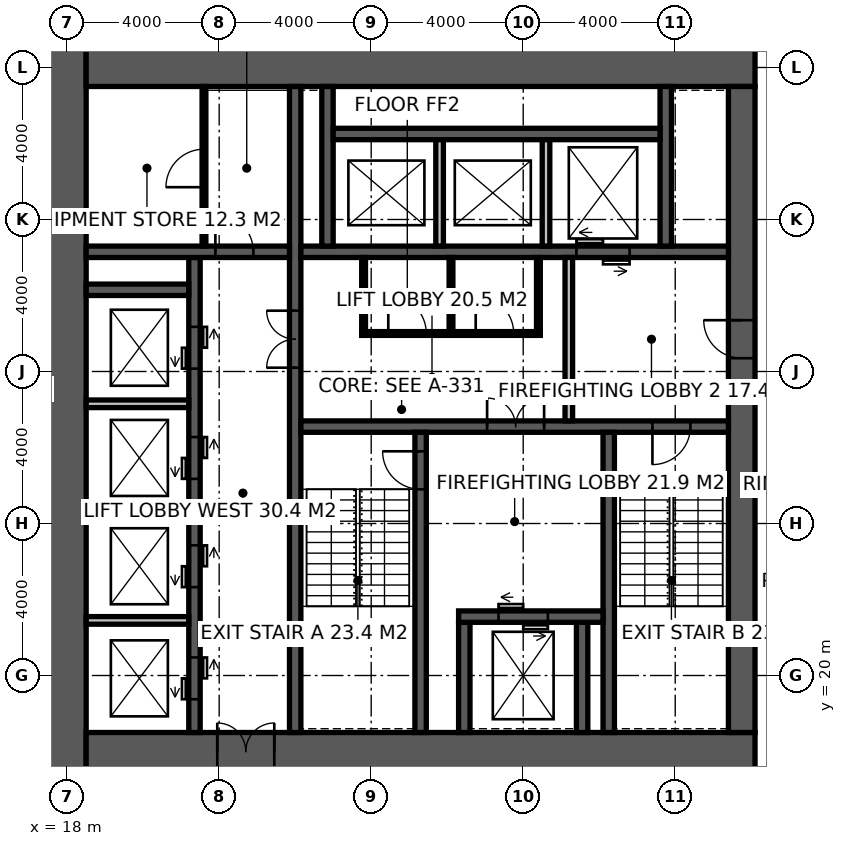
"""IFC4 building model, lengths in metres.
Left out: names, types, materials, properties, quantities, classifications, styles, units other than length and angle.
Written with IfcOpenShell. Run it as: python <this file> out.ifc"""

import sys

from ifc_helpers import new_model, si_unit, direction, frame, frame_2d, origin, place, context, subcontext, project, spatial, rectangle, extrude, element, fill, save


model = new_model("IFC4")
c1 = context("Model", 3, precision=1e-05, world=origin(), true_north=direction((0.0, 1.0)))
c2 = subcontext(c1, "Body", "Model", "MODEL_VIEW")
j1 = project(units=[si_unit("LENGTHUNIT", "METRE"), si_unit("PLANEANGLEUNIT", "RADIAN")], contexts=[c1])
p1 = place(None, origin())
s1 = spatial("IfcSite", under=j1, at=p1, CompositionType="ELEMENT")
p2 = place(p1, origin())
s2 = spatial("IfcBuilding", under=s1, at=p2, CompositionType="ELEMENT")
p3 = place(p2, frame((0.0, 0.0, 179.8)))
s3 = spatial("IfcBuildingStorey", under=s2, at=p3, CompositionType="ELEMENT", Elevation=179.8)
p4 = place(p3, frame((18.0, 17.5, -0.15), z_axis=(0.0, 0.0, 1.0), x_axis=(0.0, 1.0, 0.0)))
e1 = element("IfcWall", 1, at=p4, inside=s3, PredefinedType="SHEAR", context=c2, shape_type="SweptSolid", body=[
    extrude(rectangle(XDim=19.0, YDim=1.0, at=frame_2d((9.5, 0.0))), origin(), (0.0, 0.0, 1.0), 4.0),
])
p5 = place(p3, frame((18.5, 18.0, -0.15), z_axis=(0.0, 0.0, 1.0), x_axis=(1.0, 0.0, 0.0)))
e2 = element("IfcWall", 2, at=p5, inside=s3, PredefinedType="SHEAR", context=c2, shape_type="SweptSolid", body=[
    extrude(rectangle(XDim=17.6, YDim=1.0, at=frame_2d((8.8, 0.0))), origin(), (0.0, 0.0, 1.0), 4.0),
])
p6 = place(p5, frame((3.45, 0.0, 0.15)))
e3 = element("IfcOpeningElement", 3, at=p6, cuts=e2, PredefinedType="OPENING", context=c2, shape_type="SweptSolid", body=[
    extrude(rectangle(XDim=1.5, YDim=2.4, at=frame_2d((0.75, 1.2))), frame((0.0, 0.51, 0.0), z_axis=(0.0, -1.0, 0.0), x_axis=(1.0, 0.0, 0.0)), (0.0, 0.0, 1.0), 1.02),
])
p7 = place(p3, frame((18.5, 36.0, -0.15), z_axis=(0.0, 0.0, 1.0), x_axis=(1.0, 0.0, 0.0)))
e4 = element("IfcWall", 4, at=p7, inside=s3, PredefinedType="SHEAR", context=c2, shape_type="SweptSolid", body=[
    extrude(rectangle(XDim=17.6, YDim=1.0, at=frame_2d((8.8, 0.0))), origin(), (0.0, 0.0, 1.0), 4.0),
])
p8 = place(p3, frame((35.75, 18.5, -0.15), z_axis=(0.0, 0.0, 1.0), x_axis=(0.0, 1.0, 0.0)))
e5 = element("IfcWall", 5, at=p8, inside=s3, PredefinedType="SHEAR", context=c2, shape_type="SweptSolid", body=[
    extrude(rectangle(XDim=17.0, YDim=0.7, at=frame_2d((8.5, 0.0))), origin(), (0.0, 0.0, 1.0), 4.0),
])
p9 = place(p8, frame((9.85, 0.0, 0.15)))
e6 = element("IfcOpeningElement", 6, at=p9, cuts=e5, PredefinedType="OPENING", context=c2, shape_type="SweptSolid", body=[
    extrude(rectangle(XDim=1.0, YDim=2.2, at=frame_2d((0.5, 1.1))), frame((0.0, 0.36, 0.0), z_axis=(0.0, -1.0, 0.0), x_axis=(1.0, 0.0, 0.0)), (0.0, 0.0, 1.0), 0.72),
])
p10 = place(p3, frame((24.0, 18.5, -0.15), z_axis=(0.0, 0.0, 1.0), x_axis=(0.0, 1.0, 0.0)))
e7 = element("IfcWall", 7, at=p10, inside=s3, PredefinedType="SHEAR", context=c2, shape_type="SweptSolid", body=[
    extrude(rectangle(XDim=17.0, YDim=0.3, at=frame_2d((8.5, 0.0))), origin(), (0.0, 0.0, 1.0), 4.0),
])
p11 = place(p10, frame((9.6, 0.0, 0.15)))
e8 = element("IfcOpeningElement", 8, at=p11, cuts=e7, PredefinedType="OPENING", context=c2, shape_type="SweptSolid", body=[
    extrude(rectangle(XDim=1.5, YDim=2.4, at=frame_2d((0.75, 1.2))), frame((0.0, 0.16, 0.0), z_axis=(0.0, -1.0, 0.0), x_axis=(1.0, 0.0, 0.0)), (0.0, 0.0, 1.0), 0.32),
])
p12 = place(p3, frame((24.15, 26.55, -0.15), z_axis=(0.0, 0.0, 1.0), x_axis=(1.0, 0.0, 0.0)))
e9 = element("IfcWall", 9, at=p12, inside=s3, PredefinedType="SHEAR", context=c2, shape_type="SweptSolid", body=[
    extrude(rectangle(XDim=11.25, YDim=0.3, at=frame_2d((5.625, 0.0))), origin(), (0.0, 0.0, 1.0), 4.0),
])
p13 = place(p12, frame((9.25, 0.0, 0.15)))
e10 = element("IfcOpeningElement", 10, at=p13, cuts=e9, PredefinedType="OPENING", context=c2, shape_type="SweptSolid", body=[
    extrude(rectangle(XDim=1.0, YDim=2.2, at=frame_2d((0.5, 1.1))), frame((0.0, 0.16, 0.0), z_axis=(0.0, -1.0, 0.0), x_axis=(1.0, 0.0, 0.0)), (0.0, 0.0, 1.0), 0.32),
])
p14 = place(p12, frame((4.9, 0.0, 0.15)))
e11 = element("IfcOpeningElement", 11, at=p14, cuts=e9, PredefinedType="OPENING", context=c2, shape_type="SweptSolid", body=[
    extrude(rectangle(XDim=1.5, YDim=2.4, at=frame_2d((0.75, 1.2))), frame((0.0, 0.16, 0.0), z_axis=(0.0, -1.0, 0.0), x_axis=(1.0, 0.0, 0.0)), (0.0, 0.0, 1.0), 0.32),
])
p15 = place(p3, frame((27.3, 18.5, -0.15), z_axis=(0.0, 0.0, 1.0), x_axis=(0.0, 1.0, 0.0)))
e12 = element("IfcWall", 12, at=p15, inside=s3, PredefinedType="SHEAR", context=c2, shape_type="SweptSolid", body=[
    extrude(rectangle(XDim=7.9, YDim=0.3, at=frame_2d((3.95, 0.0))), origin(), (0.0, 0.0, 1.0), 4.0),
])
p16 = place(p15, frame((6.4, 0.0, 0.15)))
e13 = element("IfcOpeningElement", 13, at=p16, cuts=e12, PredefinedType="OPENING", context=c2, shape_type="SweptSolid", body=[
    extrude(rectangle(XDim=1.0, YDim=2.2, at=frame_2d((0.5, 1.1))), frame((0.0, 0.16, 0.0), z_axis=(0.0, -1.0, 0.0), x_axis=(1.0, 0.0, 0.0)), (0.0, 0.0, 1.0), 0.32),
])
p17 = place(p3, frame((32.25, 18.5, -0.15), z_axis=(0.0, 0.0, 1.0), x_axis=(0.0, 1.0, 0.0)))
e14 = element("IfcWall", 14, at=p17, inside=s3, PredefinedType="SHEAR", context=c2, shape_type="SweptSolid", body=[
    extrude(rectangle(XDim=7.9, YDim=0.3, at=frame_2d((3.95, 0.0))), origin(), (0.0, 0.0, 1.0), 4.0),
])
for number, where, z_axis, x_axis in (
    (15, (28.45, 18.5, -0.15), (0.0, 0.0, 1.0), (0.0, 1.0, 0.0)),
    (16, (31.55, 18.5, -0.15), (0.0, 0.0, 1.0), (0.0, 1.0, 0.0)),
):
    element("IfcWall", number, at=place(p3, frame(where, z_axis=z_axis, x_axis=x_axis)), inside=s3, PredefinedType="SHEAR", context=c2, shape_type="SweptSolid", body=[
        extrude(rectangle(XDim=2.9, YDim=0.3, at=frame_2d((1.45, 0.0))), origin(), (0.0, 0.0, 1.0), 4.0),
    ])
p18 = place(p3, frame((28.3, 21.55, -0.15), z_axis=(0.0, 0.0, 1.0), x_axis=(1.0, 0.0, 0.0)))
e17 = element("IfcWall", 17, at=p18, inside=s3, PredefinedType="SHEAR", context=c2, shape_type="SweptSolid", body=[
    extrude(rectangle(XDim=3.8, YDim=0.3, at=frame_2d((1.9, 0.0))), origin(), (0.0, 0.0, 1.0), 4.0),
])
p19 = place(p18, frame((1.05, 0.0, 0.15)))
e18 = element("IfcOpeningElement", 18, at=p19, cuts=e17, PredefinedType="OPENING", context=c2, shape_type="SweptSolid", body=[
    extrude(rectangle(XDim=1.3, YDim=2.4, at=frame_2d((0.65, 1.2))), frame((0.0, 0.16, 0.0), z_axis=(0.0, -1.0, 0.0), x_axis=(1.0, 0.0, 0.0)), (0.0, 0.0, 1.0), 0.32),
])
p20 = place(p3, frame((24.15, 31.15, -0.15), z_axis=(0.0, 0.0, 1.0), x_axis=(1.0, 0.0, 0.0)))
e19 = element("IfcWall", 19, at=p20, inside=s3, PredefinedType="SHEAR", context=c2, shape_type="SweptSolid", body=[
    extrude(rectangle(XDim=11.25, YDim=0.3, at=frame_2d((5.625, 0.0))), origin(), (0.0, 0.0, 1.0), 4.0),
])
p21 = place(p20, frame((7.25, 0.0, 0.15)))
e20 = element("IfcOpeningElement", 20, at=p21, cuts=e19, PredefinedType="OPENING", context=c2, shape_type="SweptSolid", body=[
    extrude(rectangle(XDim=1.4, YDim=2.4, at=frame_2d((0.7, 1.2))), frame((0.0, 0.16, 0.0), z_axis=(0.0, -1.0, 0.0), x_axis=(1.0, 0.0, 0.0)), (0.0, 0.0, 1.0), 0.32),
])
p22 = place(p3, frame((21.35, 18.5, -0.15), z_axis=(0.0, 0.0, 1.0), x_axis=(0.0, 1.0, 0.0)))
e21 = element("IfcWall", 21, at=p22, inside=s3, PredefinedType="SHEAR", context=c2, shape_type="SweptSolid", body=[
    extrude(rectangle(XDim=12.5, YDim=0.3, at=frame_2d((6.25, 0.0))), origin(), (0.0, 0.0, 1.0), 4.0),
])
p23 = place(p22, frame((0.875, 0.0, 0.15)))
e22 = element("IfcOpeningElement", 22, at=p23, cuts=e21, PredefinedType="OPENING", context=c2, shape_type="SweptSolid", body=[
    extrude(rectangle(XDim=1.1, YDim=2.2, at=frame_2d((0.55, 1.1))), frame((0.0, 0.16, 0.0), z_axis=(0.0, -1.0, 0.0), x_axis=(1.0, 0.0, 0.0)), (0.0, 0.0, 1.0), 0.32),
])
p24 = place(p22, frame((3.825, 0.0, 0.15)))
e23 = element("IfcOpeningElement", 23, at=p24, cuts=e21, PredefinedType="OPENING", context=c2, shape_type="SweptSolid", body=[
    extrude(rectangle(XDim=1.1, YDim=2.2, at=frame_2d((0.55, 1.1))), frame((0.0, 0.16, 0.0), z_axis=(0.0, -1.0, 0.0), x_axis=(1.0, 0.0, 0.0)), (0.0, 0.0, 1.0), 0.32),
])
p25 = place(p22, frame((6.675, 0.0, 0.15)))
e24 = element("IfcOpeningElement", 24, at=p25, cuts=e21, PredefinedType="OPENING", context=c2, shape_type="SweptSolid", body=[
    extrude(rectangle(XDim=1.1, YDim=2.2, at=frame_2d((0.55, 1.1))), frame((0.0, 0.16, 0.0), z_axis=(0.0, -1.0, 0.0), x_axis=(1.0, 0.0, 0.0)), (0.0, 0.0, 1.0), 0.32),
])
p26 = place(p22, frame((9.575, 0.0, 0.15)))
e25 = element("IfcOpeningElement", 25, at=p26, cuts=e21, PredefinedType="OPENING", context=c2, shape_type="SweptSolid", body=[
    extrude(rectangle(XDim=1.1, YDim=2.2, at=frame_2d((0.55, 1.1))), frame((0.0, 0.16, 0.0), z_axis=(0.0, -1.0, 0.0), x_axis=(1.0, 0.0, 0.0)), (0.0, 0.0, 1.0), 0.32),
])
p27 = place(p3, frame((18.5, 31.15, -0.15), z_axis=(0.0, 0.0, 1.0), x_axis=(1.0, 0.0, 0.0)))
e26 = element("IfcWall", 26, at=p27, inside=s3, PredefinedType="SHEAR", context=c2, shape_type="SweptSolid", body=[
    extrude(rectangle(XDim=5.35, YDim=0.3, at=frame_2d((2.675, 0.0))), origin(), (0.0, 0.0, 1.0), 4.0),
])
p28 = place(p27, frame((3.4, 0.0, 0.15)))
e27 = element("IfcOpeningElement", 27, at=p28, cuts=e26, PredefinedType="OPENING", context=c2, shape_type="SweptSolid", body=[
    extrude(rectangle(XDim=1.0, YDim=2.2, at=frame_2d((0.5, 1.1))), frame((0.0, 0.16, 0.0), z_axis=(0.0, -1.0, 0.0), x_axis=(1.0, 0.0, 0.0)), (0.0, 0.0, 1.0), 0.32),
])
p29 = place(p3, frame((18.5, 30.15, -0.15), z_axis=(0.0, 0.0, 1.0), x_axis=(1.0, 0.0, 0.0)))
e28 = element("IfcWall", 28, at=p29, inside=s3, PredefinedType="SHEAR", context=c2, shape_type="SweptSolid", body=[
    extrude(rectangle(XDim=2.7, YDim=0.3, at=frame_2d((1.35, 0.0))), origin(), (0.0, 0.0, 1.0), 4.0),
])
for number, where, z_axis, x_axis in (
    (29, (24.85, 31.3, -0.15), (0.0, 0.0, 1.0), (0.0, 1.0, 0.0)),
    (30, (33.75, 31.3, -0.15), (0.0, 0.0, 1.0), (0.0, 1.0, 0.0)),
):
    element("IfcWall", number, at=place(p3, frame(where, z_axis=z_axis, x_axis=x_axis)), inside=s3, PredefinedType="SHEAR", context=c2, shape_type="SweptSolid", body=[
        extrude(rectangle(XDim=4.2, YDim=0.3, at=frame_2d((2.1, 0.0))), origin(), (0.0, 0.0, 1.0), 4.0),
    ])
p30 = place(p3, frame((25.0, 34.25, -0.15), z_axis=(0.0, 0.0, 1.0), x_axis=(1.0, 0.0, 0.0)))
e31 = element("IfcWall", 31, at=p30, inside=s3, PredefinedType="SHEAR", context=c2, shape_type="SweptSolid", body=[
    extrude(rectangle(XDim=8.6, YDim=0.3, at=frame_2d((4.3, 0.0))), origin(), (0.0, 0.0, 1.0), 4.0),
])
for number, where, z_axis, x_axis in (
    (32, (27.8, 31.3, -0.15), (0.0, 0.0, 1.0), (0.0, 1.0, 0.0)),
    (33, (30.6, 31.3, -0.15), (0.0, 0.0, 1.0), (0.0, 1.0, 0.0)),
):
    element("IfcWall", number, at=place(p3, frame(where, z_axis=z_axis, x_axis=x_axis)), inside=s3, PredefinedType="SOLIDWALL", context=c2, shape_type="SweptSolid", body=[
        extrude(rectangle(XDim=2.8, YDim=0.2, at=frame_2d((1.4, 0.0))), origin(), (0.0, 0.0, 1.0), 4.0),
    ])
for number, where, z_axis, x_axis in (
    (34, (18.5, 21.45, -0.15), (0.0, 0.0, 1.0), (1.0, 0.0, 0.0)),
    (35, (18.5, 24.3, -0.15), (0.0, 0.0, 1.0), (1.0, 0.0, 0.0)),
    (36, (18.5, 27.15, -0.15), (0.0, 0.0, 1.0), (1.0, 0.0, 0.0)),
):
    element("IfcWall", number, at=place(p3, frame(where, z_axis=z_axis, x_axis=x_axis)), inside=s3, PredefinedType="SOLIDWALL", context=c2, shape_type="SweptSolid", body=[
        extrude(rectangle(XDim=2.7, YDim=0.2, at=frame_2d((1.35, 0.0))), origin(), (0.0, 0.0, 1.0), 4.0),
    ])
p31 = place(p3, frame((31.2, 26.7, 0.0), z_axis=(0.0, 0.0, 1.0), x_axis=(0.0, 1.0, 0.0)))
e37 = element("IfcWall", 37, at=p31, inside=s3, PredefinedType="SOLIDWALL", context=c2, shape_type="SweptSolid", body=[
    extrude(rectangle(XDim=4.3, YDim=0.2, at=frame_2d((2.15, 0.0))), origin(), (0.0, 0.0, 1.0), 3.85),
])
p32 = place(p3, frame((21.6, 31.3, 0.0), z_axis=(0.0, 0.0, 1.0), x_axis=(0.0, 1.0, 0.0)))
e38 = element("IfcWall", 38, at=p32, inside=s3, PredefinedType="PARTITIONING", context=c2, shape_type="SweptSolid", body=[
    extrude(rectangle(XDim=4.2, YDim=0.1, at=frame_2d((2.1, 0.0))), origin(), (0.0, 0.0, 1.0), 3.85),
])
p33 = place(p32, frame((1.55, 0.0, 0.0)))
e39 = element("IfcOpeningElement", 39, at=p33, cuts=e38, PredefinedType="OPENING", context=c2, shape_type="SweptSolid", body=[
    extrude(rectangle(XDim=1.0, YDim=2.2, at=frame_2d((0.5, 1.1))), frame((0.0, 0.06, 0.0), z_axis=(0.0, -1.0, 0.0), x_axis=(1.0, 0.0, 0.0)), (0.0, 0.0, 1.0), 0.12),
])
p34 = place(p3, frame((25.75, 29.0, 0.0), z_axis=(0.0, 0.0, 1.0), x_axis=(1.0, 0.0, 0.0)))
e40 = element("IfcWall", 40, at=p34, inside=s3, PredefinedType="PARTITIONING", context=c2, shape_type="SweptSolid", body=[
    extrude(rectangle(XDim=4.7, YDim=0.1, at=frame_2d((2.35, 0.0))), origin(), (0.0, 0.0, 1.0), 3.85),
])
p35 = place(p34, frame((0.7, 0.0, 0.0)))
e41 = element("IfcOpeningElement", 41, at=p35, cuts=e40, PredefinedType="OPENING", context=c2, shape_type="SweptSolid", body=[
    extrude(rectangle(XDim=1.0, YDim=2.2, at=frame_2d((0.5, 1.1))), frame((0.0, 0.06, 0.0), z_axis=(0.0, -1.0, 0.0), x_axis=(1.0, 0.0, 0.0)), (0.0, 0.0, 1.0), 0.12),
])
p36 = place(p34, frame((3.0, 0.0, 0.0)))
e42 = element("IfcOpeningElement", 42, at=p36, cuts=e40, PredefinedType="OPENING", context=c2, shape_type="SweptSolid", body=[
    extrude(rectangle(XDim=1.0, YDim=2.2, at=frame_2d((0.5, 1.1))), frame((0.0, 0.06, 0.0), z_axis=(0.0, -1.0, 0.0), x_axis=(1.0, 0.0, 0.0)), (0.0, 0.0, 1.0), 0.12),
])
for number, where, z_axis, x_axis in (
    (43, (25.8, 29.05, 0.0), (0.0, 0.0, 1.0), (0.0, 1.0, 0.0)),
    (44, (30.4, 29.05, 0.0), (0.0, 0.0, 1.0), (0.0, 1.0, 0.0)),
    (45, (28.1, 29.05, 0.0), (0.0, 0.0, 1.0), (0.0, 1.0, 0.0)),
):
    element("IfcWall", number, at=place(p3, frame(where, z_axis=z_axis, x_axis=x_axis)), inside=s3, PredefinedType="PARTITIONING", context=c2, shape_type="SweptSolid", body=[
        extrude(rectangle(XDim=1.95, YDim=0.1, at=frame_2d((0.975, 0.0))), origin(), (0.0, 0.0, 1.0), 3.85),
    ])
p37 = place(p16, origin())
e46 = element("IfcDoor", 46, at=p37, inside=s3, OperationType="SINGLE_SWING_RIGHT", PredefinedType="DOOR", context=c2, shape_type="SweptSolid", body=[
    extrude(rectangle(XDim=1.0, YDim=2.2, at=frame_2d((0.5, 1.1))), frame((0.0, 0.025, 0.0), z_axis=(0.0, -1.0, 0.0), x_axis=(1.0, 0.0, 0.0)), (0.0, 0.0, 1.0), 0.05),
])
fill(e13, e46)
p38 = place(p13, frame((1.0, 0.0, 0.0), z_axis=(0.0, 0.0, 1.0), x_axis=(-1.0, 0.0, 0.0)))
e47 = element("IfcDoor", 47, at=p38, inside=s3, OperationType="SINGLE_SWING_RIGHT", PredefinedType="DOOR", context=c2, shape_type="SweptSolid", body=[
    extrude(rectangle(XDim=1.0, YDim=2.2, at=frame_2d((0.5, 1.1))), frame((0.0, 0.025, 0.0), z_axis=(0.0, -1.0, 0.0), x_axis=(1.0, 0.0, 0.0)), (0.0, 0.0, 1.0), 0.05),
])
fill(e10, e47)
p39 = place(p9, origin())
e48 = element("IfcDoor", 48, at=p39, inside=s3, OperationType="SINGLE_SWING_RIGHT", PredefinedType="DOOR", context=c2, shape_type="SweptSolid", body=[
    extrude(rectangle(XDim=1.0, YDim=2.2, at=frame_2d((0.5, 1.1))), frame((0.0, 0.025, 0.0), z_axis=(0.0, -1.0, 0.0), x_axis=(1.0, 0.0, 0.0)), (0.0, 0.0, 1.0), 0.05),
])
fill(e6, e48)
p40 = place(p14, origin())
e49 = element("IfcDoor", 49, at=p40, inside=s3, OperationType="DOUBLE_DOOR_DOUBLE_SWING", PredefinedType="DOOR", context=c2, shape_type="SweptSolid", body=[
    extrude(rectangle(XDim=1.5, YDim=2.4, at=frame_2d((0.75, 1.2))), frame((0.0, 0.025, 0.0), z_axis=(0.0, -1.0, 0.0), x_axis=(1.0, 0.0, 0.0)), (0.0, 0.0, 1.0), 0.05),
])
fill(e11, e49)
p41 = place(p11, origin())
e50 = element("IfcDoor", 50, at=p41, inside=s3, OperationType="DOUBLE_DOOR_DOUBLE_SWING", PredefinedType="DOOR", context=c2, shape_type="SweptSolid", body=[
    extrude(rectangle(XDim=1.5, YDim=2.4, at=frame_2d((0.75, 1.2))), frame((0.0, 0.025, 0.0), z_axis=(0.0, -1.0, 0.0), x_axis=(1.0, 0.0, 0.0)), (0.0, 0.0, 1.0), 0.05),
])
fill(e8, e50)
p42 = place(p28, origin())
e51 = element("IfcDoor", 51, at=p42, inside=s3, OperationType="SINGLE_SWING_LEFT", PredefinedType="DOOR", context=c2, shape_type="SweptSolid", body=[
    extrude(rectangle(XDim=1.0, YDim=2.2, at=frame_2d((0.5, 1.1))), frame((0.0, 0.025, 0.0), z_axis=(0.0, -1.0, 0.0), x_axis=(1.0, 0.0, 0.0)), (0.0, 0.0, 1.0), 0.05),
])
fill(e27, e51)
p43 = place(p33, origin())
e52 = element("IfcDoor", 52, at=p43, inside=s3, OperationType="SINGLE_SWING_LEFT", PredefinedType="DOOR", context=c2, shape_type="SweptSolid", body=[
    extrude(rectangle(XDim=1.0, YDim=2.2, at=frame_2d((0.5, 1.1))), frame((0.0, 0.025, 0.0), z_axis=(0.0, -1.0, 0.0), x_axis=(1.0, 0.0, 0.0)), (0.0, 0.0, 1.0), 0.05),
])
fill(e39, e52)
p44 = place(p35, origin())
e53 = element("IfcDoor", 53, at=p44, inside=s3, OperationType="SINGLE_SWING_LEFT", PredefinedType="DOOR", context=c2, shape_type="SweptSolid", body=[
    extrude(rectangle(XDim=1.0, YDim=2.2, at=frame_2d((0.5, 1.1))), frame((0.0, 0.025, 0.0), z_axis=(0.0, -1.0, 0.0), x_axis=(1.0, 0.0, 0.0)), (0.0, 0.0, 1.0), 0.05),
])
fill(e41, e53)
p45 = place(p36, origin())
e54 = element("IfcDoor", 54, at=p45, inside=s3, OperationType="SINGLE_SWING_LEFT", PredefinedType="DOOR", context=c2, shape_type="SweptSolid", body=[
    extrude(rectangle(XDim=1.0, YDim=2.2, at=frame_2d((0.5, 1.1))), frame((0.0, 0.025, 0.0), z_axis=(0.0, -1.0, 0.0), x_axis=(1.0, 0.0, 0.0)), (0.0, 0.0, 1.0), 0.05),
])
fill(e42, e54)
p46 = place(p6, origin())
e55 = element("IfcDoor", 55, at=p46, inside=s3, OperationType="DOUBLE_DOOR_DOUBLE_SWING", PredefinedType="DOOR", context=c2, shape_type="SweptSolid", body=[
    extrude(rectangle(XDim=1.5, YDim=2.4, at=frame_2d((0.75, 1.2))), frame((0.0, 0.025, 0.0), z_axis=(0.0, -1.0, 0.0), x_axis=(1.0, 0.0, 0.0)), (0.0, 0.0, 1.0), 0.05),
])
fill(e3, e55)
p47 = place(p19, origin())
e56 = element("IfcDoor", 56, at=p47, inside=s3, OperationType="DOUBLE_DOOR_SLIDING", PredefinedType="DOOR", context=c2, shape_type="SweptSolid", body=[
    extrude(rectangle(XDim=1.3, YDim=2.4, at=frame_2d((0.65, 1.2))), frame((0.0, 0.025, 0.0), z_axis=(0.0, -1.0, 0.0), x_axis=(1.0, 0.0, 0.0)), (0.0, 0.0, 1.0), 0.05),
])
fill(e18, e56)
p48 = place(p21, origin())
e57 = element("IfcDoor", 57, at=p48, inside=s3, OperationType="DOUBLE_DOOR_SLIDING", PredefinedType="DOOR", context=c2, shape_type="SweptSolid", body=[
    extrude(rectangle(XDim=1.4, YDim=2.4, at=frame_2d((0.7, 1.2))), frame((0.0, 0.025, 0.0), z_axis=(0.0, -1.0, 0.0), x_axis=(1.0, 0.0, 0.0)), (0.0, 0.0, 1.0), 0.05),
])
fill(e20, e57)
p49 = place(p23, origin())
e58 = element("IfcDoor", 58, at=p49, inside=s3, OperationType="DOUBLE_DOOR_SLIDING", PredefinedType="DOOR", context=c2, shape_type="SweptSolid", body=[
    extrude(rectangle(XDim=1.1, YDim=2.2, at=frame_2d((0.55, 1.1))), frame((0.0, 0.025, 0.0), z_axis=(0.0, -1.0, 0.0), x_axis=(1.0, 0.0, 0.0)), (0.0, 0.0, 1.0), 0.05),
])
fill(e22, e58)
p50 = place(p24, origin())
e59 = element("IfcDoor", 59, at=p50, inside=s3, OperationType="DOUBLE_DOOR_SLIDING", PredefinedType="DOOR", context=c2, shape_type="SweptSolid", body=[
    extrude(rectangle(XDim=1.1, YDim=2.2, at=frame_2d((0.55, 1.1))), frame((0.0, 0.025, 0.0), z_axis=(0.0, -1.0, 0.0), x_axis=(1.0, 0.0, 0.0)), (0.0, 0.0, 1.0), 0.05),
])
fill(e23, e59)
p51 = place(p25, origin())
e60 = element("IfcDoor", 60, at=p51, inside=s3, OperationType="DOUBLE_DOOR_SLIDING", PredefinedType="DOOR", context=c2, shape_type="SweptSolid", body=[
    extrude(rectangle(XDim=1.1, YDim=2.2, at=frame_2d((0.55, 1.1))), frame((0.0, 0.025, 0.0), z_axis=(0.0, -1.0, 0.0), x_axis=(1.0, 0.0, 0.0)), (0.0, 0.0, 1.0), 0.05),
])
fill(e24, e60)
p52 = place(p26, origin())
e61 = element("IfcDoor", 61, at=p52, inside=s3, OperationType="DOUBLE_DOOR_SLIDING", PredefinedType="DOOR", context=c2, shape_type="SweptSolid", body=[
    extrude(rectangle(XDim=1.1, YDim=2.2, at=frame_2d((0.55, 1.1))), frame((0.0, 0.025, 0.0), z_axis=(0.0, -1.0, 0.0), x_axis=(1.0, 0.0, 0.0)), (0.0, 0.0, 1.0), 0.05),
])
fill(e25, e61)
save(model, sys.argv[1])
